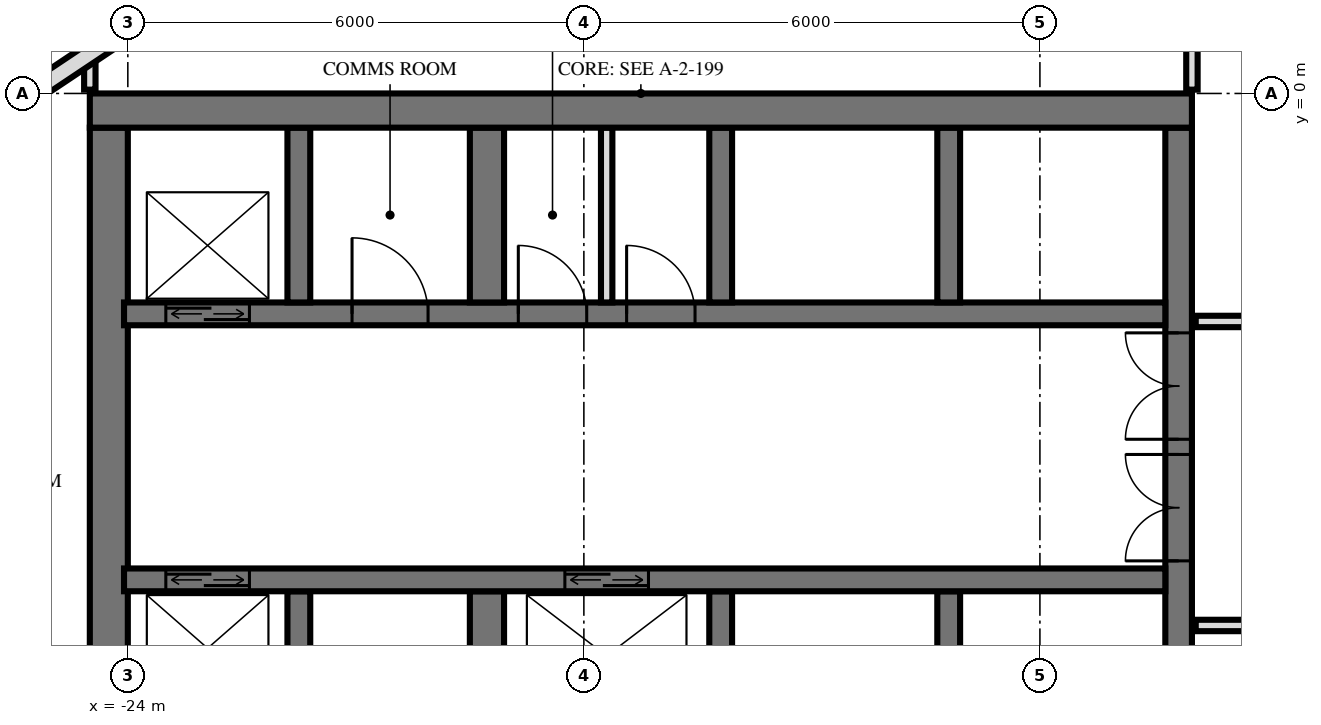
"""IFC4 building model, lengths in metres.
Left out: names, types, materials, properties, quantities, classifications, styles, units other than length and angle.
Written with IfcOpenShell. Run it as: python <this file> out.ifc"""

import sys

from ifc_helpers import new_model, si_unit, direction, frame, frame_2d, origin, place, context, subcontext, project, spatial, rectangle, extrude, element, fill, save


model = new_model("IFC4")
c1 = context("Model", 3, precision=1e-05, world=origin(), true_north=direction((0.0, 1.0)))
c2 = subcontext(c1, "Body", "Model", "MODEL_VIEW")
j1 = project(units=[si_unit("LENGTHUNIT", "METRE"), si_unit("PLANEANGLEUNIT", "RADIAN")], contexts=[c1])
p1 = place(None, origin())
s1 = spatial("IfcSite", under=j1, at=p1, CompositionType="ELEMENT")
p2 = place(p1, origin())
s2 = spatial("IfcBuilding", under=s1, at=p2, CompositionType="ELEMENT")
p3 = place(p2, frame((0.0, 0.0, 243.1)))
s3 = spatial("IfcBuildingStorey", under=s2, at=p3, CompositionType="ELEMENT", Elevation=243.1)
p4 = place(p3, frame((-24.5, -0.225, 0.0), z_axis=(0.0, 0.0, 1.0), x_axis=(1.0, 0.0, 0.0)))
e1 = element("IfcWall", 1, at=p4, inside=s3, PredefinedType="SHEAR", context=c2, shape_type="SweptSolid", body=[
    extrude(rectangle(XDim=14.5, YDim=0.45, at=frame_2d((7.25, 0.0))), origin(), (0.0, 0.0, 1.0), 3.5),
])
p5 = place(p3, frame((-10.175, -14.55, 0.0), z_axis=(0.0, 0.0, 1.0), x_axis=(0.0, 1.0, 0.0)))
e2 = element("IfcWall", 2, at=p5, inside=s3, PredefinedType="SHEAR", context=c2, shape_type="SweptSolid", body=[
    extrude(rectangle(XDim=14.1, YDim=0.35, at=frame_2d((7.05, 0.0))), origin(), (0.0, 0.0, 1.0), 3.5),
])
p6 = place(p5, frame((8.4, 0.0, 0.0)))
e3 = element("IfcOpeningElement", 3, at=p6, cuts=e2, PredefinedType="OPENING", context=c2, shape_type="SweptSolid", body=[
    extrude(rectangle(XDim=1.4, YDim=2.4, at=frame_2d((0.7, 1.2))), frame((0.0, 0.185, 0.0), z_axis=(0.0, -1.0, 0.0), x_axis=(1.0, 0.0, 0.0)), (0.0, 0.0, 1.0), 0.37),
])
p7 = place(p5, frame((10.0, 0.0, 0.0)))
e4 = element("IfcOpeningElement", 4, at=p7, cuts=e2, PredefinedType="OPENING", context=c2, shape_type="SweptSolid", body=[
    extrude(rectangle(XDim=1.4, YDim=2.4, at=frame_2d((0.7, 1.2))), frame((0.0, 0.185, 0.0), z_axis=(0.0, -1.0, 0.0), x_axis=(1.0, 0.0, 0.0)), (0.0, 0.0, 1.0), 0.37),
])
p8 = place(p5, frame((4.0, 0.0, 0.0)))
e5 = element("IfcOpeningElement", 5, at=p8, cuts=e2, PredefinedType="OPENING", context=c2, shape_type="SweptSolid", body=[
    extrude(rectangle(XDim=1.2, YDim=2.1, at=frame_2d((0.6, 1.05))), frame((0.0, 0.185, 0.0), z_axis=(0.0, -1.0, 0.0), x_axis=(1.0, 0.0, 0.0)), (0.0, 0.0, 1.0), 0.37),
])
p9 = place(p3, frame((-24.25, -14.55, 0.0), z_axis=(0.0, 0.0, 1.0), x_axis=(0.0, 1.0, 0.0)))
e6 = element("IfcWall", 6, at=p9, inside=s3, PredefinedType="SHEAR", context=c2, shape_type="SweptSolid", body=[
    extrude(rectangle(XDim=14.1, YDim=0.5, at=frame_2d((7.05, 0.0))), origin(), (0.0, 0.0, 1.0), 3.5),
])
p10 = place(p3, frame((-24.05, -2.9, 0.0), z_axis=(0.0, 0.0, 1.0), x_axis=(1.0, 0.0, 0.0)))
e7 = element("IfcWall", 7, at=p10, inside=s3, PredefinedType="SHEAR", context=c2, shape_type="SweptSolid", body=[
    extrude(rectangle(XDim=13.7, YDim=0.3, at=frame_2d((6.85, 0.0))), origin(), (0.0, 0.0, 1.0), 3.5),
])
p11 = place(p10, frame((0.55, 0.0, 0.0)))
e8 = element("IfcOpeningElement", 8, at=p11, cuts=e7, PredefinedType="OPENING", context=c2, shape_type="SweptSolid", body=[
    extrude(rectangle(XDim=1.1, YDim=2.1, at=frame_2d((0.55, 1.05))), frame((0.0, 0.16, 0.0), z_axis=(0.0, -1.0, 0.0), x_axis=(1.0, 0.0, 0.0)), (0.0, 0.0, 1.0), 0.32),
])
p12 = place(p10, frame((6.613, 0.0, 0.0)))
e9 = element("IfcOpeningElement", 9, at=p12, cuts=e7, PredefinedType="OPENING", context=c2, shape_type="SweptSolid", body=[
    extrude(rectangle(XDim=0.9, YDim=2.1, at=frame_2d((0.45, 1.05))), frame((0.0, 0.16, 0.0), z_axis=(0.0, -1.0, 0.0), x_axis=(1.0, 0.0, 0.0)), (0.0, 0.0, 1.0), 0.32),
])
p13 = place(p10, frame((5.188, 0.0, 0.0)))
e10 = element("IfcOpeningElement", 10, at=p13, cuts=e7, PredefinedType="OPENING", context=c2, shape_type="SweptSolid", body=[
    extrude(rectangle(XDim=0.9, YDim=2.1, at=frame_2d((0.45, 1.05))), frame((0.0, 0.16, 0.0), z_axis=(0.0, -1.0, 0.0), x_axis=(1.0, 0.0, 0.0)), (0.0, 0.0, 1.0), 0.32),
])
p14 = place(p10, frame((3.0, 0.0, 0.0)))
e11 = element("IfcOpeningElement", 11, at=p14, cuts=e7, PredefinedType="OPENING", context=c2, shape_type="SweptSolid", body=[
    extrude(rectangle(XDim=1.0, YDim=2.1, at=frame_2d((0.5, 1.05))), frame((0.0, 0.16, 0.0), z_axis=(0.0, -1.0, 0.0), x_axis=(1.0, 0.0, 0.0)), (0.0, 0.0, 1.0), 0.32),
])
p15 = place(p3, frame((-24.05, -6.4, 0.0), z_axis=(0.0, 0.0, 1.0), x_axis=(1.0, 0.0, 0.0)))
e12 = element("IfcWall", 12, at=p15, inside=s3, PredefinedType="SHEAR", context=c2, shape_type="SweptSolid", body=[
    extrude(rectangle(XDim=13.7, YDim=0.3, at=frame_2d((6.85, 0.0))), origin(), (0.0, 0.0, 1.0), 3.5),
])
p16 = place(p15, frame((0.55, 0.0, 0.0)))
e13 = element("IfcOpeningElement", 13, at=p16, cuts=e12, PredefinedType="OPENING", context=c2, shape_type="SweptSolid", body=[
    extrude(rectangle(XDim=1.1, YDim=2.1, at=frame_2d((0.55, 1.05))), frame((0.0, 0.16, 0.0), z_axis=(0.0, -1.0, 0.0), x_axis=(1.0, 0.0, 0.0)), (0.0, 0.0, 1.0), 0.32),
])
p17 = place(p15, frame((5.8, 0.0, 0.0)))
e14 = element("IfcOpeningElement", 14, at=p17, cuts=e12, PredefinedType="OPENING", context=c2, shape_type="SweptSolid", body=[
    extrude(rectangle(XDim=1.1, YDim=2.1, at=frame_2d((0.55, 1.05))), frame((0.0, 0.16, 0.0), z_axis=(0.0, -1.0, 0.0), x_axis=(1.0, 0.0, 0.0)), (0.0, 0.0, 1.0), 0.32),
])
for number, where, z_axis, x_axis in (
    (15, (-13.2, -2.75, 0.0), (0.0, 0.0, 1.0), (0.0, 1.0, 0.0)),
    (16, (-13.2, -8.85, 0.0), (0.0, 0.0, 1.0), (0.0, 1.0, 0.0)),
    (17, (-16.2, -2.75, 0.0), (0.0, 0.0, 1.0), (0.0, 1.0, 0.0)),
    (18, (-16.2, -8.85, 0.0), (0.0, 0.0, 1.0), (0.0, 1.0, 0.0)),
):
    element("IfcWall", number, at=place(p3, frame(where, z_axis=z_axis, x_axis=x_axis)), inside=s3, PredefinedType="SHEAR", context=c2, shape_type="SweptSolid", body=[
        extrude(rectangle(XDim=2.3, YDim=0.3, at=frame_2d((1.15, 0.0))), origin(), (0.0, 0.0, 1.0), 3.5),
    ])
for number, where, z_axis, x_axis in (
    (19, (-19.275, -2.75, 0.0), (0.0, 0.0, 1.0), (0.0, 1.0, 0.0)),
    (20, (-19.275, -8.85, 0.0), (0.0, 0.0, 1.0), (0.0, 1.0, 0.0)),
):
    element("IfcWall", number, at=place(p3, frame(where, z_axis=z_axis, x_axis=x_axis)), inside=s3, PredefinedType="SHEAR", context=c2, shape_type="SweptSolid", body=[
        extrude(rectangle(XDim=2.3, YDim=0.45, at=frame_2d((1.15, 0.0))), origin(), (0.0, 0.0, 1.0), 3.5),
    ])
for number, where, z_axis, x_axis in (
    (21, (-21.75, -2.75, 0.0), (0.0, 0.0, 1.0), (0.0, 1.0, 0.0)),
    (22, (-21.75, -8.85, 0.0), (0.0, 0.0, 1.0), (0.0, 1.0, 0.0)),
):
    element("IfcWall", number, at=place(p3, frame(where, z_axis=z_axis, x_axis=x_axis)), inside=s3, PredefinedType="SHEAR", context=c2, shape_type="SweptSolid", body=[
        extrude(rectangle(XDim=2.3, YDim=0.3, at=frame_2d((1.15, 0.0))), origin(), (0.0, 0.0, 1.0), 3.5),
    ])
p18 = place(p3, frame((-24.194, 0.726, 0.0), z_axis=(0.0, 0.0, 1.0), x_axis=(-0.831482937015, -0.55555029066, 0.0)))
e23 = element("IfcWall", 23, at=p18, inside=s3, PredefinedType="SOLIDWALL", context=c2, shape_type="SweptSolid", body=[
    extrude(rectangle(XDim=1.656, YDim=0.25, at=frame_2d((0.828, 0.0))), origin(), (0.0, 0.0, 1.0), 3.2),
])
p19 = place(p3, frame((-17.7, -2.75, 0.0), z_axis=(0.0, 0.0, 1.0), x_axis=(0.0, 1.0, 0.0)))
e24 = element("IfcWall", 24, at=p19, inside=s3, PredefinedType="PARTITIONING", context=c2, shape_type="SweptSolid", body=[
    extrude(rectangle(XDim=2.3, YDim=0.15, at=frame_2d((1.15, 0.0))), origin(), (0.0, 0.0, 1.0), 3.2),
])
p20 = place(p3, frame((-10.0, 0.05, 0.0), z_axis=(0.0, 0.0, 1.0), x_axis=(0.0, 1.0, 0.0)))
e25 = element("IfcWall", 25, at=p20, inside=s3, PredefinedType="PARTITIONING", context=c2, shape_type="SweptSolid", body=[
    extrude(rectangle(XDim=0.97, YDim=0.15, at=frame_2d((0.485, 0.0))), origin(), (0.0, 0.0, 1.0), 3.22),
])
p21 = place(p3, frame((-24.5, 0.05, 0.0), z_axis=(0.0, 0.0, 1.0), x_axis=(0.0, 1.0, 0.0)))
e26 = element("IfcWall", 26, at=p21, inside=s3, PredefinedType="PARTITIONING", context=c2, shape_type="SweptSolid", body=[
    extrude(rectangle(XDim=0.405, YDim=0.15, at=frame_2d((0.203, 0.0))), origin(), (0.0, 0.0, 1.0), 3.22),
])
p22 = place(p3, frame((-9.95, -7.0, 0.0), z_axis=(0.0, 0.0, 1.0), x_axis=(1.0, 0.0, 0.0)))
e27 = element("IfcWall", 27, at=p22, inside=s3, PredefinedType="PARTITIONING", context=c2, shape_type="SweptSolid", body=[
    extrude(rectangle(XDim=19.9, YDim=0.15, at=frame_2d((9.95, 0.0))), origin(), (0.0, 0.0, 1.0), 3.22),
])
p23 = place(p22, frame((9.45, 0.0, 0.0)))
e28 = element("IfcOpeningElement", 28, at=p23, cuts=e27, PredefinedType="OPENING", context=c2, shape_type="SweptSolid", body=[
    extrude(rectangle(XDim=1.0, YDim=2.1, at=frame_2d((0.5, 1.05))), frame((0.0, 0.085, 0.0), z_axis=(0.0, -1.0, 0.0), x_axis=(1.0, 0.0, 0.0)), (0.0, 0.0, 1.0), 0.17),
])
p24 = place(p22, frame((15.45, 0.0, 0.0)))
e29 = element("IfcOpeningElement", 29, at=p24, cuts=e27, PredefinedType="OPENING", context=c2, shape_type="SweptSolid", body=[
    extrude(rectangle(XDim=1.0, YDim=2.1, at=frame_2d((0.5, 1.05))), frame((0.0, 0.085, 0.0), z_axis=(0.0, -1.0, 0.0), x_axis=(1.0, 0.0, 0.0)), (0.0, 0.0, 1.0), 0.17),
])
p25 = place(p3, frame((-9.95, -3.0, 0.0), z_axis=(0.0, 0.0, 1.0), x_axis=(1.0, 0.0, 0.0)))
e30 = element("IfcWall", 30, at=p25, inside=s3, PredefinedType="PARTITIONING", context=c2, shape_type="SweptSolid", body=[
    extrude(rectangle(XDim=19.9, YDim=0.15, at=frame_2d((9.95, 0.0))), origin(), (0.0, 0.0, 1.0), 3.22),
])
p26 = place(p25, frame((2.2, 0.0, 0.0)))
e31 = element("IfcOpeningElement", 31, at=p26, cuts=e30, PredefinedType="OPENING", context=c2, shape_type="SweptSolid", body=[
    extrude(rectangle(XDim=1.0, YDim=2.1, at=frame_2d((0.5, 1.05))), frame((0.0, 0.085, 0.0), z_axis=(0.0, -1.0, 0.0), x_axis=(1.0, 0.0, 0.0)), (0.0, 0.0, 1.0), 0.17),
])
p27 = place(p25, frame((7.2, 0.0, 0.0)))
e32 = element("IfcOpeningElement", 32, at=p27, cuts=e30, PredefinedType="OPENING", context=c2, shape_type="SweptSolid", body=[
    extrude(rectangle(XDim=1.0, YDim=2.1, at=frame_2d((0.5, 1.05))), frame((0.0, 0.085, 0.0), z_axis=(0.0, -1.0, 0.0), x_axis=(1.0, 0.0, 0.0)), (0.0, 0.0, 1.0), 0.17),
])
p28 = place(p25, frame((11.7, 0.0, 0.0)))
e33 = element("IfcOpeningElement", 33, at=p28, cuts=e30, PredefinedType="OPENING", context=c2, shape_type="SweptSolid", body=[
    extrude(rectangle(XDim=1.0, YDim=2.1, at=frame_2d((0.5, 1.05))), frame((0.0, 0.085, 0.0), z_axis=(0.0, -1.0, 0.0), x_axis=(1.0, 0.0, 0.0)), (0.0, 0.0, 1.0), 0.17),
])
p29 = place(p25, frame((15.45, 0.0, 0.0)))
e34 = element("IfcOpeningElement", 34, at=p29, cuts=e30, PredefinedType="OPENING", context=c2, shape_type="SweptSolid", body=[
    extrude(rectangle(XDim=1.0, YDim=2.1, at=frame_2d((0.5, 1.05))), frame((0.0, 0.085, 0.0), z_axis=(0.0, -1.0, 0.0), x_axis=(1.0, 0.0, 0.0)), (0.0, 0.0, 1.0), 0.17),
])
p30 = place(p25, frame((18.2, 0.0, 0.0)))
e35 = element("IfcOpeningElement", 35, at=p30, cuts=e30, PredefinedType="OPENING", context=c2, shape_type="SweptSolid", body=[
    extrude(rectangle(XDim=1.0, YDim=2.1, at=frame_2d((0.5, 1.05))), frame((0.0, 0.085, 0.0), z_axis=(0.0, -1.0, 0.0), x_axis=(1.0, 0.0, 0.0)), (0.0, 0.0, 1.0), 0.17),
])
p31 = place(p11, origin())
e36 = element("IfcDoor", 36, at=p31, inside=s3, OperationType="DOUBLE_DOOR_SLIDING", PredefinedType="USERDEFINED", context=c2, shape_type="SweptSolid", body=[
    extrude(rectangle(XDim=1.1, YDim=2.1, at=frame_2d((0.55, 1.05))), frame((0.0, 0.025, 0.0), z_axis=(0.0, -1.0, 0.0), x_axis=(1.0, 0.0, 0.0)), (0.0, 0.0, 1.0), 0.05),
])
fill(e8, e36)
p32 = place(p16, origin())
e37 = element("IfcDoor", 37, at=p32, inside=s3, OperationType="DOUBLE_DOOR_SLIDING", PredefinedType="USERDEFINED", context=c2, shape_type="SweptSolid", body=[
    extrude(rectangle(XDim=1.1, YDim=2.1, at=frame_2d((0.55, 1.05))), frame((0.0, 0.025, 0.0), z_axis=(0.0, -1.0, 0.0), x_axis=(1.0, 0.0, 0.0)), (0.0, 0.0, 1.0), 0.05),
])
fill(e13, e37)
p33 = place(p17, origin())
e38 = element("IfcDoor", 38, at=p33, inside=s3, OperationType="DOUBLE_DOOR_SLIDING", PredefinedType="USERDEFINED", context=c2, shape_type="SweptSolid", body=[
    extrude(rectangle(XDim=1.1, YDim=2.1, at=frame_2d((0.55, 1.05))), frame((0.0, 0.025, 0.0), z_axis=(0.0, -1.0, 0.0), x_axis=(1.0, 0.0, 0.0)), (0.0, 0.0, 1.0), 0.05),
])
fill(e14, e38)
p34 = place(p6, origin())
e39 = element("IfcDoor", 39, at=p34, inside=s3, OperationType="DOUBLE_DOOR_SINGLE_SWING", PredefinedType="DOOR", context=c2, shape_type="SweptSolid", body=[
    extrude(rectangle(XDim=1.4, YDim=2.4, at=frame_2d((0.7, 1.2))), frame((0.0, 0.025, 0.0), z_axis=(0.0, -1.0, 0.0), x_axis=(1.0, 0.0, 0.0)), (0.0, 0.0, 1.0), 0.05),
])
fill(e3, e39)
p35 = place(p7, origin())
e40 = element("IfcDoor", 40, at=p35, inside=s3, OperationType="DOUBLE_DOOR_SINGLE_SWING", PredefinedType="DOOR", context=c2, shape_type="SweptSolid", body=[
    extrude(rectangle(XDim=1.4, YDim=2.4, at=frame_2d((0.7, 1.2))), frame((0.0, 0.025, 0.0), z_axis=(0.0, -1.0, 0.0), x_axis=(1.0, 0.0, 0.0)), (0.0, 0.0, 1.0), 0.05),
])
fill(e4, e40)
p36 = place(p12, origin())
e41 = element("IfcDoor", 41, at=p36, inside=s3, OperationType="SINGLE_SWING_RIGHT", PredefinedType="DOOR", context=c2, shape_type="SweptSolid", body=[
    extrude(rectangle(XDim=0.9, YDim=2.1, at=frame_2d((0.45, 1.05))), frame((0.0, 0.025, 0.0), z_axis=(0.0, -1.0, 0.0), x_axis=(1.0, 0.0, 0.0)), (0.0, 0.0, 1.0), 0.05),
])
fill(e9, e41)
p37 = place(p13, origin())
e42 = element("IfcDoor", 42, at=p37, inside=s3, OperationType="SINGLE_SWING_RIGHT", PredefinedType="DOOR", context=c2, shape_type="SweptSolid", body=[
    extrude(rectangle(XDim=0.9, YDim=2.1, at=frame_2d((0.45, 1.05))), frame((0.0, 0.025, 0.0), z_axis=(0.0, -1.0, 0.0), x_axis=(1.0, 0.0, 0.0)), (0.0, 0.0, 1.0), 0.05),
])
fill(e10, e42)
p38 = place(p14, origin())
e43 = element("IfcDoor", 43, at=p38, inside=s3, OperationType="SINGLE_SWING_RIGHT", PredefinedType="DOOR", context=c2, shape_type="SweptSolid", body=[
    extrude(rectangle(XDim=1.0, YDim=2.1, at=frame_2d((0.5, 1.05))), frame((0.0, 0.025, 0.0), z_axis=(0.0, -1.0, 0.0), x_axis=(1.0, 0.0, 0.0)), (0.0, 0.0, 1.0), 0.05),
])
fill(e11, e43)
save(model, sys.argv[1])
